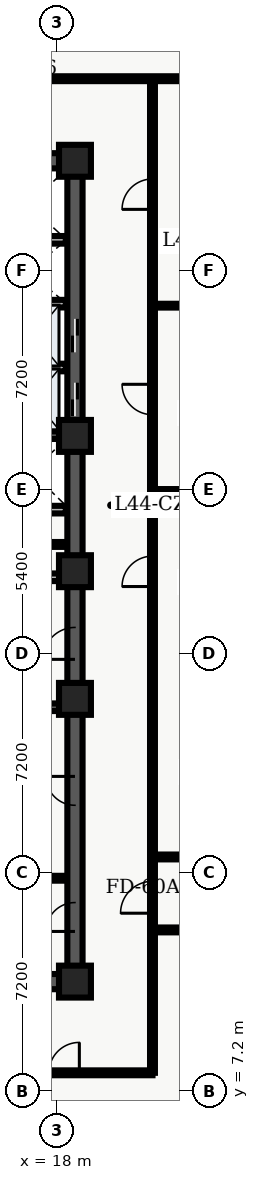
"""IFC4 building model, lengths in metres.
Left out: names, types, materials, properties, quantities, classifications, styles, units other than length and angle.
Written with IfcOpenShell. Run it as: python <this file> out.ifc"""

import sys

from ifc_helpers import new_model, entity, si_unit, converted_unit, direction, frame, origin_with_axes, origin_2d_with_axis, place, context, subcontext, project, spatial, polyline, rectangle, outline, extrude, element, fill, save


model = new_model("IFC4")
c1 = context("Model", 3, precision=1e-05, world=origin_with_axes(), true_north=direction((0.0, 1.0)))
c2 = subcontext(c1, "Body", "Model", "MODEL_VIEW")
j1 = project(units=[si_unit("LENGTHUNIT", "METRE"), converted_unit("PLANEANGLEUNIT", "DEGREE", entity("IfcPlaneAngleMeasure", 0.017), si_unit("PLANEANGLEUNIT", "RADIAN"), dimensions=[0, 0, 0, 0, 0, 0, 0])], contexts=[c1])
p1 = place(None, origin_with_axes())
s1 = spatial("IfcSite", under=j1, at=p1, CompositionType="ELEMENT")
p2 = place(p1, origin_with_axes())
s2 = spatial("IfcBuilding", under=s1, at=p2, CompositionType="ELEMENT")
p3 = place(p2, frame((0.0, 0.0, 179.7), z_axis=(0.0, 0.0, 1.0), x_axis=(1.0, 0.0, 0.0)))
s3 = spatial("IfcBuildingStorey", under=s2, at=p3, CompositionType="ELEMENT", Elevation=179.7)
p4 = place(p3, frame((11.4, 10.8, 0.0), z_axis=(0.0, 0.0, 1.0), x_axis=(1.0, 0.0, 0.0)))
e1 = element("IfcWall", 1, at=p4, inside=s3, PredefinedType="SHEAR", context=c2, shape_type="SweptSolid", body=[
    extrude(outline(polyline([(0.0, -0.25), (7.2, -0.25), (7.2, 0.25), (0.0, 0.25), (0.0, -0.25)])), origin_with_axes(), (0.0, 0.0, 1.0), 3.66),
])
p5 = place(p4, frame((2.625, 0.0, 0.0), z_axis=(0.0, 0.0, 1.0), x_axis=(1.0, 0.0, 0.0)))
e2 = element("IfcOpeningElement", 2, at=p5, cuts=e1, PredefinedType="OPENING", context=c2, shape_type="SweptSolid", body=[
    extrude(rectangle(XDim=1.05, YDim=0.52, at=origin_2d_with_axis()), origin_with_axes(), (0.0, 0.0, 1.0), 2.15),
])
p6 = place(p3, frame((11.4, 37.8, 0.0), z_axis=(0.0, 0.0, 1.0), x_axis=(1.0, 0.0, 0.0)))
e3 = element("IfcWall", 3, at=p6, inside=s3, PredefinedType="SHEAR", context=c2, shape_type="SweptSolid", body=[
    extrude(outline(polyline([(0.0, -0.25), (7.2, -0.25), (7.2, 0.25), (0.0, 0.25), (0.0, -0.25)])), origin_with_axes(), (0.0, 0.0, 1.0), 3.66),
])
p7 = place(p6, frame((2.625, 0.0, 0.0), z_axis=(0.0, 0.0, 1.0), x_axis=(1.0, 0.0, 0.0)))
e4 = element("IfcOpeningElement", 4, at=p7, cuts=e3, PredefinedType="OPENING", context=c2, shape_type="SweptSolid", body=[
    extrude(rectangle(XDim=1.05, YDim=0.52, at=origin_2d_with_axis()), origin_with_axes(), (0.0, 0.0, 1.0), 2.15),
])
p8 = place(p3, frame((18.6, 10.8, 0.0), z_axis=(0.0, 0.0, 1.0), x_axis=(0.0, 1.0, 0.0)))
e5 = element("IfcWall", 5, at=p8, inside=s3, PredefinedType="SHEAR", context=c2, shape_type="SweptSolid", body=[
    extrude(outline(polyline([(0.0, -0.25), (13.5, -0.25), (13.5, 0.25), (0.0, 0.25), (0.0, -0.25)])), origin_with_axes(), (0.0, 0.0, 1.0), 3.66),
])
p9 = place(p8, frame((11.125, 0.0, 0.0), z_axis=(0.0, 0.0, 1.0), x_axis=(1.0, 0.0, 0.0)))
e6 = element("IfcOpeningElement", 6, at=p9, cuts=e5, PredefinedType="OPENING", context=c2, shape_type="SweptSolid", body=[
    extrude(rectangle(XDim=1.05, YDim=0.52, at=origin_2d_with_axis()), origin_with_axes(), (0.0, 0.0, 1.0), 2.15),
])
p10 = place(p8, frame((2.125, 0.0, 0.0), z_axis=(0.0, 0.0, 1.0), x_axis=(1.0, 0.0, 0.0)))
e7 = element("IfcOpeningElement", 7, at=p10, cuts=e5, PredefinedType="OPENING", context=c2, shape_type="SweptSolid", body=[
    extrude(rectangle(XDim=0.95, YDim=0.52, at=origin_2d_with_axis()), origin_with_axes(), (0.0, 0.0, 1.0), 2.15),
])
p11 = place(p8, frame((6.275, 0.0, 0.0), z_axis=(0.0, 0.0, 1.0), x_axis=(1.0, 0.0, 0.0)))
e8 = element("IfcOpeningElement", 8, at=p11, cuts=e5, PredefinedType="OPENING", context=c2, shape_type="SweptSolid", body=[
    extrude(rectangle(XDim=0.95, YDim=0.52, at=origin_2d_with_axis()), origin_with_axes(), (0.0, 0.0, 1.0), 2.15),
])
p12 = place(p3, frame((18.6, 24.3, 0.0), z_axis=(0.0, 0.0, 1.0), x_axis=(0.0, 1.0, 0.0)))
e9 = element("IfcWall", 9, at=p12, inside=s3, PredefinedType="SHEAR", context=c2, shape_type="SweptSolid", body=[
    extrude(outline(polyline([(0.0, -0.25), (13.5, -0.25), (13.5, 0.25), (0.0, 0.25), (0.0, -0.25)])), origin_with_axes(), (0.0, 0.0, 1.0), 3.66),
])
p13 = place(p12, frame((5.65, 0.0, 0.0), z_axis=(0.0, 0.0, 1.0), x_axis=(1.0, 0.0, 0.0)))
e10 = element("IfcOpeningElement", 10, at=p13, cuts=e9, PredefinedType="OPENING", context=c2, shape_type="SweptSolid", body=[
    extrude(rectangle(XDim=1.1, YDim=0.52, at=origin_2d_with_axis()), origin_with_axes(), (0.0, 0.0, 1.0), 2.15),
])
p14 = place(p12, frame((7.75, 0.0, 0.0), z_axis=(0.0, 0.0, 1.0), x_axis=(1.0, 0.0, 0.0)))
e11 = element("IfcOpeningElement", 11, at=p14, cuts=e9, PredefinedType="OPENING", context=c2, shape_type="SweptSolid", body=[
    extrude(rectangle(XDim=1.1, YDim=0.52, at=origin_2d_with_axis()), origin_with_axes(), (0.0, 0.0, 1.0), 2.15),
])
for number, where, z_axis, x_axis in (
    (12, (11.65, 19.825, 0.0), (0.0, 0.0, 1.0), (1.0, 0.0, 0.0)),
    (13, (11.65, 28.775, 0.0), (0.0, 0.0, 1.0), (1.0, 0.0, 0.0)),
):
    element("IfcWall", number, at=place(p3, frame(where, z_axis=z_axis, x_axis=x_axis)), inside=s3, PredefinedType="SHEAR", context=c2, shape_type="SweptSolid", body=[
        extrude(outline(polyline([(0.0, -0.125), (6.7, -0.125), (6.7, 0.125), (0.0, 0.125), (0.0, -0.125)])), origin_with_axes(), (0.0, 0.0, 1.0), 3.66),
    ])
p15 = place(p3, frame((11.7, 24.1, 0.0), z_axis=(0.0, 0.0, 1.0), x_axis=(1.0, 0.0, 0.0)))
e14 = element("IfcWall", 14, at=p15, inside=s3, PredefinedType="SOLIDWALL", context=c2, shape_type="SweptSolid", body=[
    extrude(outline(polyline([(0.0, -0.125), (6.6, -0.125), (6.6, 0.125), (0.0, 0.125), (0.0, -0.125)])), origin_with_axes(), (0.0, 0.0, 1.0), 2.7),
])
p16 = place(p15, frame((3.75, 0.0, 0.0), z_axis=(0.0, 0.0, 1.0), x_axis=(1.0, 0.0, 0.0)))
e15 = element("IfcOpeningElement", 15, at=p16, cuts=e14, PredefinedType="OPENING", context=c2, shape_type="SweptSolid", body=[
    extrude(rectangle(XDim=0.9, YDim=0.27, at=origin_2d_with_axis()), origin_with_axes(), (0.0, 0.0, 1.0), 2.15),
])
p17 = place(p3, frame((11.7, 26.325, 0.0), z_axis=(0.0, 0.0, 1.0), x_axis=(1.0, 0.0, 0.0)))
e16 = element("IfcWall", 16, at=p17, inside=s3, PredefinedType="SOLIDWALL", context=c2, shape_type="SweptSolid", body=[
    extrude(outline(polyline([(0.0, -0.125), (6.6, -0.125), (6.6, 0.125), (0.0, 0.125), (0.0, -0.125)])), origin_with_axes(), (0.0, 0.0, 1.0), 2.7),
])
p18 = place(p17, frame((3.5, 0.0, 0.0), z_axis=(0.0, 0.0, 1.0), x_axis=(1.0, 0.0, 0.0)))
e17 = element("IfcOpeningElement", 17, at=p18, cuts=e16, PredefinedType="OPENING", context=c2, shape_type="SweptSolid", body=[
    extrude(rectangle(XDim=0.9, YDim=0.27, at=origin_2d_with_axis()), origin_with_axes(), (0.0, 0.0, 1.0), 2.15),
])
for number, where, z_axis, x_axis in (
    (18, (18.6, 10.8, 0.0), (0.0, 0.0, 1.0), (1.0, 0.0, 0.0)),
    (19, (18.6, 20.1, 0.0), (0.0, 0.0, 1.0), (1.0, 0.0, 0.0)),
    (20, (18.6, 24.3, 0.0), (0.0, 0.0, 1.0), (1.0, 0.0, 0.0)),
    (21, (18.6, 28.75, 0.0), (0.0, 0.0, 1.0), (1.0, 0.0, 0.0)),
    (22, (18.6, 37.8, 0.0), (0.0, 0.0, 1.0), (1.0, 0.0, 0.0)),
):
    element("IfcColumn", number, at=place(p3, frame(where, z_axis=z_axis, x_axis=x_axis)), inside=s3, PredefinedType="COLUMN", context=c2, shape_type="SweptSolid", body=[
        extrude(rectangle(XDim=1.05, YDim=1.05, at=origin_2d_with_axis()), origin_with_axes(), (0.0, 0.0, 1.0), 3.9),
    ])
p19 = place(p3, frame((14.62, 25.18, 0.0), z_axis=(0.0, 0.0, 1.0), x_axis=(1.0, 0.0, 0.0)))
e23 = element("IfcWall", 23, at=p19, inside=s3, PredefinedType="PARTITIONING", context=c2, shape_type="SweptSolid", body=[
    extrude(outline(polyline([(0.0, -0.08), (3.68, -0.08), (3.68, 0.08), (0.0, 0.08), (0.0, -0.08)])), origin_with_axes(), (0.0, 0.0, 1.0), 2.7),
])
p20 = place(p19, frame((1.95, 0.0, 0.0), z_axis=(0.0, 0.0, 1.0), x_axis=(1.0, 0.0, 0.0)))
e24 = element("IfcOpeningElement", 24, at=p20, cuts=e23, PredefinedType="OPENING", context=c2, shape_type="SweptSolid", body=[
    extrude(rectangle(XDim=0.9, YDim=0.18, at=origin_2d_with_axis()), origin_with_axes(), (0.0, 0.0, 1.0), 2.15),
])
p21 = place(p3, frame((15.84, 14.2, 0.0), z_axis=(0.0, 0.0, 1.0), x_axis=(1.0, 0.0, 0.0)))
e25 = element("IfcWall", 25, at=p21, inside=s3, PredefinedType="PARTITIONING", context=c2, shape_type="SweptSolid", body=[
    extrude(outline(polyline([(0.0, -0.08), (2.46, -0.08), (2.46, 0.08), (0.0, 0.08), (0.0, -0.08)])), origin_with_axes(), (0.0, 0.0, 1.0), 2.7),
])
for number, where, z_axis, x_axis in (
    (26, (15.84, 31.0, 0.0), (0.0, 0.0, 1.0), (1.0, 0.0, 0.0)),
    (27, (15.84, 33.1, 0.0), (0.0, 0.0, 1.0), (1.0, 0.0, 0.0)),
    (28, (15.84, 35.2, 0.0), (0.0, 0.0, 1.0), (1.0, 0.0, 0.0)),
):
    element("IfcWall", number, at=place(p3, frame(where, z_axis=z_axis, x_axis=x_axis)), inside=s3, PredefinedType="SOLIDWALL", context=c2, shape_type="SweptSolid", body=[
        extrude(outline(polyline([(0.0, -0.125), (2.46, -0.125), (2.46, 0.125), (0.0, 0.125), (0.0, -0.125)])), origin_with_axes(), (0.0, 0.0, 1.0), 2.7),
    ])
p22 = place(p3, frame((2.6, 7.8, 0.0), z_axis=(0.0, 0.0, 1.0), x_axis=(1.0, 0.0, 0.0)))
e29 = element("IfcWall", 29, at=p22, inside=s3, PredefinedType="PARTITIONING", context=c2, shape_type="SweptSolid", body=[
    extrude(outline(polyline([(0.0, -0.08), (18.55, -0.08), (18.55, 0.08), (0.0, 0.08), (0.0, -0.08)])), origin_with_axes(), (0.0, 0.0, 1.0), 2.7),
])
p23 = place(p22, frame((1.851, 0.0, 0.0), z_axis=(0.0, 0.0, 1.0), x_axis=(1.0, 0.0, 0.0)))
e30 = element("IfcOpeningElement", 30, at=p23, cuts=e29, PredefinedType="OPENING", context=c2, shape_type="SweptSolid", body=[
    extrude(rectangle(XDim=1.0, YDim=0.18, at=origin_2d_with_axis()), origin_with_axes(), (0.0, 0.0, 1.0), 2.15),
])
p24 = place(p22, frame((6.255, 0.0, 0.0), z_axis=(0.0, 0.0, 1.0), x_axis=(1.0, 0.0, 0.0)))
e31 = element("IfcOpeningElement", 31, at=p24, cuts=e29, PredefinedType="OPENING", context=c2, shape_type="SweptSolid", body=[
    extrude(rectangle(XDim=1.0, YDim=0.18, at=origin_2d_with_axis()), origin_with_axes(), (0.0, 0.0, 1.0), 2.15),
])
p25 = place(p22, frame((10.794, 0.0, 0.0), z_axis=(0.0, 0.0, 1.0), x_axis=(1.0, 0.0, 0.0)))
e32 = element("IfcOpeningElement", 32, at=p25, cuts=e29, PredefinedType="OPENING", context=c2, shape_type="SweptSolid", body=[
    extrude(rectangle(XDim=1.0, YDim=0.18, at=origin_2d_with_axis()), origin_with_axes(), (0.0, 0.0, 1.0), 2.15),
])
p26 = place(p22, frame((15.645, 0.0, 0.0), z_axis=(0.0, 0.0, 1.0), x_axis=(1.0, 0.0, 0.0)))
e33 = element("IfcOpeningElement", 33, at=p26, cuts=e29, PredefinedType="OPENING", context=c2, shape_type="SweptSolid", body=[
    extrude(rectangle(XDim=1.0, YDim=0.18, at=origin_2d_with_axis()), origin_with_axes(), (0.0, 0.0, 1.0), 2.15),
])
p27 = place(p3, frame((2.6, 40.5, 0.0), z_axis=(0.0, 0.0, 1.0), x_axis=(1.0, 0.0, 0.0)))
e34 = element("IfcWall", 34, at=p27, inside=s3, PredefinedType="PARTITIONING", context=c2, shape_type="SweptSolid", body=[
    extrude(outline(polyline([(0.0, -0.08), (22.87, -0.08), (22.87, 0.08), (0.0, 0.08), (0.0, -0.08)])), origin_with_axes(), (0.0, 0.0, 1.0), 2.7),
])
p28 = place(p27, frame((2.386, 0.0, 0.0), z_axis=(0.0, 0.0, 1.0), x_axis=(1.0, 0.0, 0.0)))
e35 = element("IfcOpeningElement", 35, at=p28, cuts=e34, PredefinedType="OPENING", context=c2, shape_type="SweptSolid", body=[
    extrude(rectangle(XDim=1.0, YDim=0.18, at=origin_2d_with_axis()), origin_with_axes(), (0.0, 0.0, 1.0), 2.15),
])
p29 = place(p27, frame((7.631, 0.0, 0.0), z_axis=(0.0, 0.0, 1.0), x_axis=(1.0, 0.0, 0.0)))
e36 = element("IfcOpeningElement", 36, at=p29, cuts=e34, PredefinedType="OPENING", context=c2, shape_type="SweptSolid", body=[
    extrude(rectangle(XDim=1.0, YDim=0.18, at=origin_2d_with_axis()), origin_with_axes(), (0.0, 0.0, 1.0), 2.15),
])
p30 = place(p27, frame((13.999, 0.0, 0.0), z_axis=(0.0, 0.0, 1.0), x_axis=(1.0, 0.0, 0.0)))
e37 = element("IfcOpeningElement", 37, at=p30, cuts=e34, PredefinedType="OPENING", context=c2, shape_type="SweptSolid", body=[
    extrude(rectangle(XDim=1.2, YDim=0.18, at=origin_2d_with_axis()), origin_with_axes(), (0.0, 0.0, 1.0), 2.2),
])
p31 = place(p3, frame((21.15, 7.8, 0.0), z_axis=(0.0, 0.0, 1.0), x_axis=(0.0, 1.0, 0.0)))
e38 = element("IfcWall", 38, at=p31, inside=s3, PredefinedType="PARTITIONING", context=c2, shape_type="SweptSolid", body=[
    extrude(outline(polyline([(0.0, -0.08), (32.7, -0.08), (32.7, 0.08), (0.0, 0.08), (0.0, -0.08)])), origin_with_axes(), (0.0, 0.0, 1.0), 2.7),
])
p32 = place(p31, frame((16.495, 0.0, 0.0), z_axis=(0.0, 0.0, 1.0), x_axis=(1.0, 0.0, 0.0)))
e39 = element("IfcOpeningElement", 39, at=p32, cuts=e38, PredefinedType="OPENING", context=c2, shape_type="SweptSolid", body=[
    extrude(rectangle(XDim=1.0, YDim=0.18, at=origin_2d_with_axis()), origin_with_axes(), (0.0, 0.0, 1.0), 2.15),
])
p33 = place(p31, frame((22.148, 0.0, 0.0), z_axis=(0.0, 0.0, 1.0), x_axis=(1.0, 0.0, 0.0)))
e40 = element("IfcOpeningElement", 40, at=p33, cuts=e38, PredefinedType="OPENING", context=c2, shape_type="SweptSolid", body=[
    extrude(rectangle(XDim=1.0, YDim=0.18, at=origin_2d_with_axis()), origin_with_axes(), (0.0, 0.0, 1.0), 2.15),
])
p34 = place(p31, frame((28.902, 0.0, 0.0), z_axis=(0.0, 0.0, 1.0), x_axis=(1.0, 0.0, 0.0)))
e41 = element("IfcOpeningElement", 41, at=p34, cuts=e38, PredefinedType="OPENING", context=c2, shape_type="SweptSolid", body=[
    extrude(rectangle(XDim=1.0, YDim=0.18, at=origin_2d_with_axis()), origin_with_axes(), (0.0, 0.0, 1.0), 2.15),
])
p35 = place(p31, frame((5.775, 0.0, 0.0), z_axis=(0.0, 0.0, 1.0), x_axis=(1.0, 0.0, 0.0)))
e42 = element("IfcOpeningElement", 42, at=p35, cuts=e38, PredefinedType="OPENING", context=c2, shape_type="SweptSolid", body=[
    extrude(rectangle(XDim=1.05, YDim=0.18, at=origin_2d_with_axis()), origin_with_axes(), (0.0, 0.0, 1.0), 2.15),
])
p36 = place(p3, frame((21.3, 26.861, 0.0), z_axis=(0.0, 0.0, 1.0), x_axis=(1.0, 0.0, 0.0)))
e43 = element("IfcWall", 43, at=p36, inside=s3, PredefinedType="PARTITIONING", context=c2, shape_type="SweptSolid", body=[
    extrude(outline(polyline([(0.0, -0.14), (4.17, -0.14), (4.17, 0.14), (0.0, 0.14), (0.0, -0.14)])), origin_with_axes(), (0.0, 0.0, 1.0), 2.7),
])
p37 = place(p3, frame((21.3, 33.034, 0.0), z_axis=(0.0, 0.0, 1.0), x_axis=(1.0, 0.0, 0.0)))
e44 = element("IfcWall", 44, at=p37, inside=s3, PredefinedType="PARTITIONING", context=c2, shape_type="SweptSolid", body=[
    extrude(outline(polyline([(0.0, -0.062), (4.17, -0.062), (4.17, 0.062), (0.0, 0.062), (0.0, -0.062)])), origin_with_axes(), (0.0, 0.0, 1.0), 2.7),
])
p38 = place(p3, frame((21.15, 12.5, 0.0), z_axis=(0.0, 0.0, 1.0), x_axis=(1.0, 0.0, 0.0)))
e45 = element("IfcWall", 45, at=p38, inside=s3, PredefinedType="PARTITIONING", context=c2, shape_type="SweptSolid", body=[
    extrude(outline(polyline([(0.0, -0.08), (15.2, -0.08), (15.2, 0.08), (0.0, 0.08), (0.0, -0.08)])), origin_with_axes(), (0.0, 0.0, 1.0), 2.7),
])
p39 = place(p38, frame((1.761, 0.0, 0.0), z_axis=(0.0, 0.0, 1.0), x_axis=(1.0, 0.0, 0.0)))
e46 = element("IfcOpeningElement", 46, at=p39, cuts=e45, PredefinedType="OPENING", context=c2, shape_type="SweptSolid", body=[
    extrude(rectangle(XDim=1.0, YDim=0.18, at=origin_2d_with_axis()), origin_with_axes(), (0.0, 0.0, 1.0), 2.15),
])
p40 = place(p38, frame((4.896, 0.0, 0.0), z_axis=(0.0, 0.0, 1.0), x_axis=(1.0, 0.0, 0.0)))
e47 = element("IfcOpeningElement", 47, at=p40, cuts=e45, PredefinedType="OPENING", context=c2, shape_type="SweptSolid", body=[
    extrude(rectangle(XDim=1.0, YDim=0.18, at=origin_2d_with_axis()), origin_with_axes(), (0.0, 0.0, 1.0), 2.15),
])
p41 = place(p38, frame((8.536, 0.0, 0.0), z_axis=(0.0, 0.0, 1.0), x_axis=(1.0, 0.0, 0.0)))
e48 = element("IfcOpeningElement", 48, at=p41, cuts=e45, PredefinedType="OPENING", context=c2, shape_type="SweptSolid", body=[
    extrude(rectangle(XDim=1.0, YDim=0.18, at=origin_2d_with_axis()), origin_with_axes(), (0.0, 0.0, 1.0), 2.15),
])
p42 = place(p38, frame((12.871, 0.0, 0.0), z_axis=(0.0, 0.0, 1.0), x_axis=(1.0, 0.0, 0.0)))
e49 = element("IfcOpeningElement", 49, at=p42, cuts=e45, PredefinedType="OPENING", context=c2, shape_type="SweptSolid", body=[
    extrude(rectangle(XDim=1.0, YDim=0.18, at=origin_2d_with_axis()), origin_with_axes(), (0.0, 0.0, 1.0), 2.15),
])
p43 = place(p3, frame((21.15, 14.9, 0.0), z_axis=(0.0, 0.0, 1.0), x_axis=(1.0, 0.0, 0.0)))
e50 = element("IfcWall", 50, at=p43, inside=s3, PredefinedType="PARTITIONING", context=c2, shape_type="SweptSolid", body=[
    extrude(outline(polyline([(0.0, -0.08), (15.2, -0.08), (15.2, 0.08), (0.0, 0.08), (0.0, -0.08)])), origin_with_axes(), (0.0, 0.0, 1.0), 2.7),
])
p44 = place(p43, frame((7.65, 0.0, 0.0), z_axis=(0.0, 0.0, 1.0), x_axis=(1.0, 0.0, 0.0)))
e51 = element("IfcOpeningElement", 51, at=p44, cuts=e50, PredefinedType="OPENING", context=c2, shape_type="SweptSolid", body=[
    extrude(rectangle(XDim=1.0, YDim=0.18, at=origin_2d_with_axis()), origin_with_axes(), (0.0, 0.0, 1.0), 2.15),
])
p45 = place(p12, frame((5.65, 0.0, 0.0), z_axis=(0.0, 0.0, 1.0), x_axis=(1.0, 0.0, 0.0)))
e52 = element("IfcDoor", 52, at=p45, inside=s3, OperationType="SLIDING_TO_LEFT", PredefinedType="DOOR", context=c2, shape_type="SweptSolid", body=[
    extrude(rectangle(XDim=1.1, YDim=0.09, at=origin_2d_with_axis()), origin_with_axes(), (0.0, 0.0, 1.0), 2.15),
])
fill(e10, e52)
p46 = place(p12, frame((7.75, 0.0, 0.0), z_axis=(0.0, 0.0, 1.0), x_axis=(1.0, 0.0, 0.0)))
e53 = element("IfcDoor", 53, at=p46, inside=s3, OperationType="SLIDING_TO_RIGHT", PredefinedType="DOOR", context=c2, shape_type="SweptSolid", body=[
    extrude(rectangle(XDim=1.1, YDim=0.09, at=origin_2d_with_axis()), origin_with_axes(), (0.0, 0.0, 1.0), 2.15),
])
fill(e11, e53)
p47 = place(p8, frame((11.125, 0.0, 0.0), z_axis=(0.0, 0.0, 1.0), x_axis=(1.0, 0.0, 0.0)))
e54 = element("IfcDoor", 54, at=p47, inside=s3, OperationType="SINGLE_SWING_LEFT", PredefinedType="DOOR", context=c2, shape_type="SweptSolid", body=[
    extrude(rectangle(XDim=1.05, YDim=0.09, at=origin_2d_with_axis()), origin_with_axes(), (0.0, 0.0, 1.0), 2.15),
])
fill(e6, e54)
p48 = place(p8, frame((2.125, 0.0, 0.0), z_axis=(0.0, 0.0, 1.0), x_axis=(1.0, 0.0, 0.0)))
e55 = element("IfcDoor", 55, at=p48, inside=s3, OperationType="SINGLE_SWING_LEFT", PredefinedType="DOOR", context=c2, shape_type="SweptSolid", body=[
    extrude(rectangle(XDim=0.95, YDim=0.09, at=origin_2d_with_axis()), origin_with_axes(), (0.0, 0.0, 1.0), 2.15),
])
fill(e7, e55)
p49 = place(p8, frame((6.275, 0.0, 0.0), z_axis=(0.0, 0.0, 1.0), x_axis=(1.0, 0.0, 0.0)))
e56 = element("IfcDoor", 56, at=p49, inside=s3, OperationType="SINGLE_SWING_RIGHT", PredefinedType="DOOR", context=c2, shape_type="SweptSolid", body=[
    extrude(rectangle(XDim=0.95, YDim=0.09, at=origin_2d_with_axis()), origin_with_axes(), (0.0, 0.0, 1.0), 2.15),
])
fill(e8, e56)
p50 = place(p22, frame((15.645, 0.0, 0.0), z_axis=(0.0, 0.0, 1.0), x_axis=(1.0, 0.0, 0.0)))
e57 = element("IfcDoor", 57, at=p50, inside=s3, OperationType="SINGLE_SWING_RIGHT", PredefinedType="DOOR", context=c2, shape_type="SweptSolid", body=[
    extrude(rectangle(XDim=1.0, YDim=0.09, at=origin_2d_with_axis()), origin_with_axes(), (0.0, 0.0, 1.0), 2.15),
])
fill(e33, e57)
p51 = place(p31, frame((16.495, 0.0, 0.0), z_axis=(0.0, 0.0, 1.0), x_axis=(1.0, 0.0, 0.0)))
e58 = element("IfcDoor", 58, at=p51, inside=s3, OperationType="SINGLE_SWING_LEFT", PredefinedType="DOOR", context=c2, shape_type="SweptSolid", body=[
    extrude(rectangle(XDim=1.0, YDim=0.09, at=origin_2d_with_axis()), origin_with_axes(), (0.0, 0.0, 1.0), 2.15),
])
fill(e39, e58)
p52 = place(p31, frame((22.148, 0.0, 0.0), z_axis=(0.0, 0.0, 1.0), x_axis=(1.0, 0.0, 0.0)))
e59 = element("IfcDoor", 59, at=p52, inside=s3, OperationType="SINGLE_SWING_RIGHT", PredefinedType="DOOR", context=c2, shape_type="SweptSolid", body=[
    extrude(rectangle(XDim=1.0, YDim=0.09, at=origin_2d_with_axis()), origin_with_axes(), (0.0, 0.0, 1.0), 2.15),
])
fill(e40, e59)
p53 = place(p31, frame((28.902, 0.0, 0.0), z_axis=(0.0, 0.0, 1.0), x_axis=(1.0, 0.0, 0.0)))
e60 = element("IfcDoor", 60, at=p53, inside=s3, OperationType="SINGLE_SWING_LEFT", PredefinedType="DOOR", context=c2, shape_type="SweptSolid", body=[
    extrude(rectangle(XDim=1.0, YDim=0.09, at=origin_2d_with_axis()), origin_with_axes(), (0.0, 0.0, 1.0), 2.15),
])
fill(e41, e60)
p54 = place(p31, frame((5.775, 0.0, 0.0), z_axis=(0.0, 0.0, 1.0), x_axis=(1.0, 0.0, 0.0)))
e61 = element("IfcDoor", 61, at=p54, inside=s3, OperationType="SINGLE_SWING_LEFT", PredefinedType="DOOR", context=c2, shape_type="SweptSolid", body=[
    extrude(rectangle(XDim=1.05, YDim=0.09, at=origin_2d_with_axis()), origin_with_axes(), (0.0, 0.0, 1.0), 2.15),
])
fill(e42, e61)
save(model, sys.argv[1])
